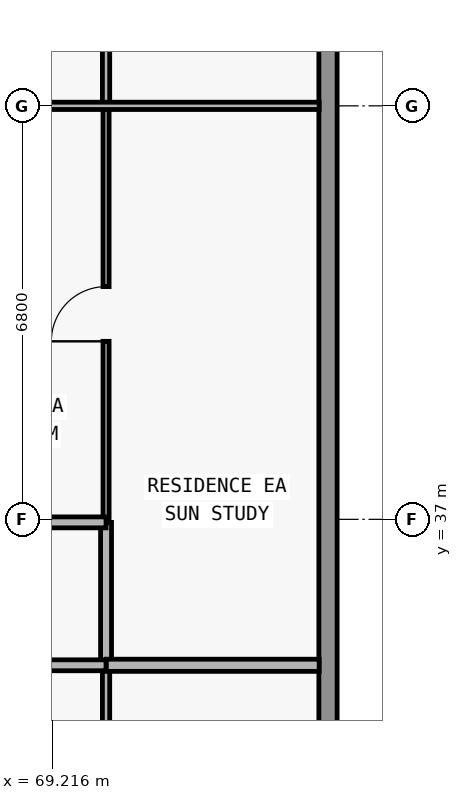
"""IFC4 building model, lengths in metres.
Left out: names, types, materials, properties, quantities, classifications, styles, units other than length and angle.
Written with IfcOpenShell. Run it as: python <this file> out.ifc"""

import sys

from ifc_helpers import new_model, si_unit, direction, frame, frame_2d, origin, place, context, subcontext, project, spatial, rectangle, extrude, element, fill, save


model = new_model("IFC4")
c1 = context("Model", 3, precision=1e-05, world=origin(), true_north=direction((0.0, 1.0)))
c2 = subcontext(c1, "Body", "Model", "MODEL_VIEW")
j1 = project(units=[si_unit("LENGTHUNIT", "METRE"), si_unit("PLANEANGLEUNIT", "RADIAN")], contexts=[c1])
p1 = place(None, origin())
s1 = spatial("IfcSite", under=j1, at=p1, CompositionType="ELEMENT")
p2 = place(p1, origin())
s2 = spatial("IfcBuilding", under=s1, at=p2, CompositionType="ELEMENT")
p3 = place(p2, frame((0.0, 0.0, 109.2)))
s3 = spatial("IfcBuildingStorey", under=s2, at=p3, CompositionType="ELEMENT", Elevation=109.2)
p4 = place(p3, frame((73.75, 47.2, 0.0), z_axis=(0.0, 0.0, 1.0), x_axis=(0.0, -1.0, 0.0)))
e1 = element("IfcWall", 1, at=p4, inside=s3, PredefinedType="STANDARD", context=c2, shape_type="SweptSolid", body=[
    extrude(rectangle(XDim=19.2, YDim=0.3, at=frame_2d((9.6, 0.0))), origin(), (0.0, 0.0, 1.0), 3.05),
])
p5 = place(p3, frame((70.1, 30.24, 0.0), z_axis=(0.0, 0.0, 1.0), x_axis=(0.0, 1.0, 0.0)))
e2 = element("IfcWall", 2, at=p5, inside=s3, PredefinedType="PARTITIONING", context=c2, shape_type="SweptSolid", body=[
    extrude(rectangle(XDim=4.36, YDim=0.12, at=frame_2d((2.18, 0.0))), origin(), (0.0, 0.0, 1.0), 3.05),
])
p6 = place(p3, frame((70.1, 34.605, 0.0), z_axis=(0.0, 0.0, 1.0), x_axis=(0.0, 1.0, 0.0)))
e3 = element("IfcWall", 3, at=p6, inside=s3, PredefinedType="PARTITIONING", context=c2, shape_type="SweptSolid", body=[
    extrude(rectangle(XDim=2.345, YDim=0.18, at=frame_2d((1.172, 0.0))), origin(), (0.0, 0.0, 1.0), 3.05),
])
p7 = place(p3, frame((70.1, 36.955, 0.0), z_axis=(0.0, 0.0, 1.0), x_axis=(0.0, 1.0, 0.0)))
e4 = element("IfcWall", 4, at=p7, inside=s3, PredefinedType="MOVABLE", context=c2, shape_type="SweptSolid", body=[
    extrude(rectangle(XDim=6.845, YDim=0.1, at=frame_2d((3.422, 0.0))), origin(), (0.0, 0.0, 1.0), 3.05),
])
p8 = place(p7, frame((2.972, 0.0, 0.0)))
e5 = element("IfcOpeningElement", 5, at=p8, cuts=e4, PredefinedType="OPENING", context=c2, shape_type="SweptSolid", body=[
    extrude(rectangle(XDim=0.9, YDim=2.15, at=frame_2d((0.45, 1.075))), frame((0.0, 0.06, 0.0), z_axis=(0.0, -1.0, 0.0), x_axis=(1.0, 0.0, 0.0)), (0.0, 0.0, 1.0), 0.12),
])
p9 = place(p3, frame((70.1, 43.805, 0.0), z_axis=(0.0, 0.0, 1.0), x_axis=(0.0, 1.0, 0.0)))
e6 = element("IfcWall", 6, at=p9, inside=s3, PredefinedType="PARTITIONING", context=c2, shape_type="SweptSolid", body=[
    extrude(rectangle(XDim=3.275, YDim=0.12, at=frame_2d((1.638, 0.0))), origin(), (0.0, 0.0, 1.0), 3.05),
])
p10 = place(p9, frame((1.188, 0.0, 0.0)))
e7 = element("IfcOpeningElement", 7, at=p10, cuts=e6, PredefinedType="OPENING", context=c2, shape_type="SweptSolid", body=[
    extrude(rectangle(XDim=0.9, YDim=2.15, at=frame_2d((0.45, 1.075))), frame((0.0, 0.07, 0.0), z_axis=(0.0, -1.0, 0.0), x_axis=(1.0, 0.0, 0.0)), (0.0, 0.0, 1.0), 0.14),
])
p11 = place(p3, frame((59.55, 34.6, 0.0), z_axis=(0.0, 0.0, 1.0), x_axis=(1.0, 0.0, 0.0)))
e8 = element("IfcWall", 8, at=p11, inside=s3, PredefinedType="PARTITIONING", context=c2, shape_type="SweptSolid", body=[
    extrude(rectangle(XDim=10.55, YDim=0.18, at=frame_2d((5.275, 0.0))), origin(), (0.0, 0.0, 1.0), 3.05),
])
p12 = place(p11, frame((2.51, 0.0, 0.0)))
e9 = element("IfcOpeningElement", 9, at=p12, cuts=e8, PredefinedType="OPENING", context=c2, shape_type="SweptSolid", body=[
    extrude(rectangle(XDim=1.0, YDim=2.2, at=frame_2d((0.5, 1.1))), frame((0.0, 0.1, 0.0), z_axis=(0.0, -1.0, 0.0), x_axis=(1.0, 0.0, 0.0)), (0.0, 0.0, 1.0), 0.2),
])
p13 = place(p3, frame((70.105, 34.6, 0.0), z_axis=(0.0, 0.0, 1.0), x_axis=(1.0, 0.0, 0.0)))
e10 = element("IfcWall", 10, at=p13, inside=s3, PredefinedType="PARTITIONING", context=c2, shape_type="SweptSolid", body=[
    extrude(rectangle(XDim=3.5, YDim=0.2, at=frame_2d((1.75, 0.0))), origin(), (0.0, 0.0, 1.0), 3.05),
])
p14 = place(p3, frame((59.955, 36.95, 0.0), z_axis=(0.0, 0.0, 1.0), x_axis=(1.0, 0.0, 0.0)))
e11 = element("IfcWall", 11, at=p14, inside=s3, PredefinedType="PARTITIONING", context=c2, shape_type="SweptSolid", body=[
    extrude(rectangle(XDim=10.145, YDim=0.18, at=frame_2d((5.073, 0.0))), origin(), (0.0, 0.0, 1.0), 3.05),
])
p15 = place(p14, frame((3.957, 0.0, 0.0)))
e12 = element("IfcOpeningElement", 12, at=p15, cuts=e11, PredefinedType="OPENING", context=c2, shape_type="SweptSolid", body=[
    extrude(rectangle(XDim=1.0, YDim=2.2, at=frame_2d((0.5, 1.1))), frame((0.0, 0.1, 0.0), z_axis=(0.0, -1.0, 0.0), x_axis=(1.0, 0.0, 0.0)), (0.0, 0.0, 1.0), 0.2),
])
p16 = place(p3, frame((59.945, 43.8, 0.0), z_axis=(0.0, 0.0, 1.0), x_axis=(1.0, 0.0, 0.0)))
e13 = element("IfcWall", 13, at=p16, inside=s3, PredefinedType="PARTITIONING", context=c2, shape_type="SweptSolid", body=[
    extrude(rectangle(XDim=13.66, YDim=0.12, at=frame_2d((6.83, 0.0))), origin(), (0.0, 0.0, 1.0), 2.339),
])
p17 = place(p16, frame((4.017, 0.0, 0.0)))
e14 = element("IfcOpeningElement", 14, at=p17, cuts=e13, PredefinedType="OPENING", context=c2, shape_type="SweptSolid", body=[
    extrude(rectangle(XDim=0.9, YDim=2.15, at=frame_2d((0.45, 1.075))), frame((0.0, 0.07, 0.0), z_axis=(0.0, -1.0, 0.0), x_axis=(1.0, 0.0, 0.0)), (0.0, 0.0, 1.0), 0.14),
])
p18 = place(p16, frame((0.702, 0.0, 0.0)))
e15 = element("IfcOpeningElement", 15, at=p18, cuts=e13, PredefinedType="OPENING", context=c2, shape_type="SweptSolid", body=[
    extrude(rectangle(XDim=0.85, YDim=2.1, at=frame_2d((0.425, 1.05))), frame((0.0, 0.07, 0.0), z_axis=(0.0, -1.0, 0.0), x_axis=(1.0, 0.0, 0.0)), (0.0, 0.0, 1.0), 0.14),
])
p19 = place(p8, origin())
e16 = element("IfcDoor", 16, at=p19, inside=s3, OperationType="SINGLE_SWING_LEFT", PredefinedType="DOOR", context=c2, shape_type="SweptSolid", body=[
    extrude(rectangle(XDim=0.9, YDim=2.15, at=frame_2d((0.45, 1.075))), frame((0.0, 0.025, 0.0), z_axis=(0.0, -1.0, 0.0), x_axis=(1.0, 0.0, 0.0)), (0.0, 0.0, 1.0), 0.05),
])
fill(e5, e16)
save(model, sys.argv[1])
